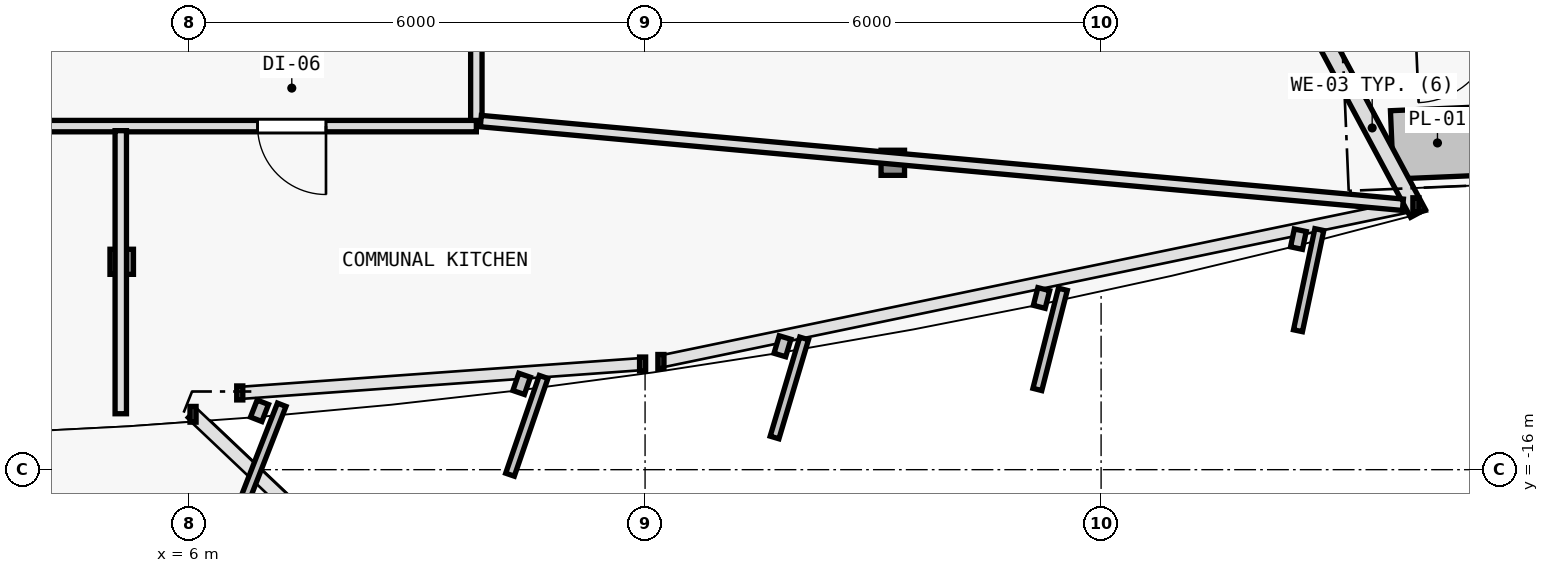
"""IFC4 building model, lengths in metres.
Left out: names, types, materials, properties, quantities, classifications, styles, units other than length and angle.
Written with IfcOpenShell. Run it as: python <this file> out.ifc"""

import sys

from ifc_helpers import new_model, si_unit, direction, frame, frame_2d, origin, origin_2d, place, context, subcontext, project, spatial, rectangle, i_section, extrude, element, fill, save


model = new_model("IFC4")
c1 = context("Model", 3, precision=1e-05, world=origin(), true_north=direction((0.0, 1.0)))
c2 = subcontext(c1, "Body", "Model", "MODEL_VIEW")
j1 = project(units=[si_unit("LENGTHUNIT", "METRE"), si_unit("PLANEANGLEUNIT", "RADIAN")], contexts=[c1])
p1 = place(None, origin())
s1 = spatial("IfcSite", under=j1, at=p1, CompositionType="ELEMENT")
p2 = place(p1, origin())
s2 = spatial("IfcBuilding", under=s1, at=p2, CompositionType="ELEMENT")
p3 = place(p2, frame((0.0, 0.0, 283.2)))
s3 = spatial("IfcBuildingStorey", under=s2, at=p3, CompositionType="ELEMENT", Elevation=283.2)
p4 = place(p3, frame((5.114, -13.265, 0.006), z_axis=(-0.006934304776, 0.03521539092, 0.999355688261), x_axis=(-0.981159154887, -0.193201223549, 0.0)))
e1 = element("IfcColumn", 1, at=p4, inside=s3, PredefinedType="COLUMN", context=c2, shape_type="SweptSolid", body=[
    extrude(i_section(OverallWidth=0.309, OverallDepth=0.33, WebThickness=0.011, FlangeThickness=0.019, FilletRadius=0.027, at=origin_2d()), origin(), (0.0, 0.0, 1.0), 3.591),
])
p5 = place(p3, frame((15.259, -11.962, 0.006), z_axis=(-0.020596292833, 0.033511459955, 0.999226087917), x_axis=(-0.851954850327, -0.523615252838, 0.0)))
e2 = element("IfcColumn", 2, at=p5, inside=s3, PredefinedType="COLUMN", context=c2, shape_type="SweptSolid", body=[
    extrude(i_section(OverallWidth=0.309, OverallDepth=0.33, WebThickness=0.011, FlangeThickness=0.019, FilletRadius=0.027, at=origin_2d()), origin(), (0.0, 0.0, 1.0), 3.592),
])
p6 = place(p3, frame((20.964, -10.381, 0.0), z_axis=(0.0, 0.0, 1.0), x_axis=(0.472728849632, -0.881207940685, 0.0)))
e3 = element("IfcWall", 3, at=p6, inside=s3, PredefinedType="SOLIDWALL", context=c2, shape_type="SweptSolid", body=[
    extrude(rectangle(XDim=2.55, YDim=0.22, at=frame_2d((1.275, 0.0))), origin(), (0.0, 0.0, 1.0), 3.35),
])
p7 = place(p3, frame((9.78, 8.226, 0.0), z_axis=(0.0, 0.0, 1.0), x_axis=(0.0, -1.0, 0.0)))
e4 = element("IfcWall", 4, at=p7, inside=s3, PredefinedType="PARTITIONING", context=c2, shape_type="SweptSolid", body=[
    extrude(rectangle(XDim=19.706, YDim=0.15, at=frame_2d((9.853, 0.0))), origin(), (0.0, 0.0, 1.0), 2.775),
])
p8 = place(p7, frame((17.333, 0.0, 0.0)))
e5 = element("IfcOpeningElement", 5, at=p8, cuts=e4, PredefinedType="OPENING", context=c2, shape_type="SweptSolid", body=[
    extrude(rectangle(XDim=0.9, YDim=2.1, at=frame_2d((0.45, 1.05))), frame((0.0, 0.085, 0.0), z_axis=(0.0, -1.0, 0.0), x_axis=(1.0, 0.0, 0.0)), (0.0, 0.0, 1.0), 0.17),
])
p9 = place(p7, frame((14.78, 0.0, 0.0)))
e6 = element("IfcOpeningElement", 6, at=p9, cuts=e4, PredefinedType="OPENING", context=c2, shape_type="SweptSolid", body=[
    extrude(rectangle(XDim=0.85, YDim=2.1, at=frame_2d((0.425, 1.05))), frame((0.0, 0.085, 0.0), z_axis=(0.0, -1.0, 0.0), x_axis=(1.0, 0.0, 0.0)), (0.0, 0.0, 1.0), 0.17),
])
p10 = place(p7, frame((13.091, 0.0, 0.0)))
e7 = element("IfcOpeningElement", 7, at=p10, cuts=e4, PredefinedType="OPENING", context=c2, shape_type="SweptSolid", body=[
    extrude(rectangle(XDim=0.85, YDim=2.1, at=frame_2d((0.425, 1.05))), frame((0.0, 0.085, 0.0), z_axis=(0.0, -1.0, 0.0), x_axis=(1.0, 0.0, 0.0)), (0.0, 0.0, 1.0), 0.17),
])
p11 = place(p7, frame((11.397, 0.0, 0.0)))
e8 = element("IfcOpeningElement", 8, at=p11, cuts=e4, PredefinedType="OPENING", context=c2, shape_type="SweptSolid", body=[
    extrude(rectangle(XDim=0.85, YDim=2.1, at=frame_2d((0.425, 1.05))), frame((0.0, 0.085, 0.0), z_axis=(0.0, -1.0, 0.0), x_axis=(1.0, 0.0, 0.0)), (0.0, 0.0, 1.0), 0.17),
])
p12 = place(p7, frame((9.138, 0.0, 0.0)))
e9 = element("IfcOpeningElement", 9, at=p12, cuts=e4, PredefinedType="OPENING", context=c2, shape_type="SweptSolid", body=[
    extrude(rectangle(XDim=0.9, YDim=2.1, at=frame_2d((0.45, 1.05))), frame((0.0, 0.085, 0.0), z_axis=(0.0, -1.0, 0.0), x_axis=(1.0, 0.0, 0.0)), (0.0, 0.0, 1.0), 0.17),
])
p13 = place(p7, frame((6.661, 0.0, 0.0)))
e10 = element("IfcOpeningElement", 10, at=p13, cuts=e4, PredefinedType="OPENING", context=c2, shape_type="SweptSolid", body=[
    extrude(rectangle(XDim=0.9, YDim=2.1, at=frame_2d((0.45, 1.05))), frame((0.0, 0.085, 0.0), z_axis=(0.0, -1.0, 0.0), x_axis=(1.0, 0.0, 0.0)), (0.0, 0.0, 1.0), 0.17),
])
p14 = place(p7, frame((4.369, 0.0, 0.0)))
e11 = element("IfcOpeningElement", 11, at=p14, cuts=e4, PredefinedType="OPENING", context=c2, shape_type="SweptSolid", body=[
    extrude(rectangle(XDim=0.9, YDim=2.1, at=frame_2d((0.45, 1.05))), frame((0.0, 0.085, 0.0), z_axis=(0.0, -1.0, 0.0), x_axis=(1.0, 0.0, 0.0)), (0.0, 0.0, 1.0), 0.17),
])
p15 = place(p3, frame((9.78, -11.48, 0.0), z_axis=(0.0, 0.0, 1.0), x_axis=(-1.0, 0.0, 0.0)))
e12 = element("IfcWall", 12, at=p15, inside=s3, PredefinedType="PARTITIONING", context=c2, shape_type="SweptSolid", body=[
    extrude(rectangle(XDim=19.56, YDim=0.15, at=frame_2d((9.78, 0.0))), origin(), (0.0, 0.0, 1.0), 2.925),
])
p16 = place(p15, frame((11.58, 0.0, 0.0)))
e13 = element("IfcOpeningElement", 13, at=p16, cuts=e12, PredefinedType="OPENING", context=c2, shape_type="SweptSolid", body=[
    extrude(rectangle(XDim=0.9, YDim=2.1, at=frame_2d((0.45, 1.05))), frame((0.0, 0.085, 0.0), z_axis=(0.0, -1.0, 0.0), x_axis=(1.0, 0.0, 0.0)), (0.0, 0.0, 1.0), 0.17),
])
p17 = place(p15, frame((1.978, 0.0, 0.0)))
e14 = element("IfcOpeningElement", 14, at=p17, cuts=e12, PredefinedType="OPENING", context=c2, shape_type="SweptSolid", body=[
    extrude(rectangle(XDim=0.9, YDim=2.1, at=frame_2d((0.45, 1.05))), frame((0.0, 0.085, 0.0), z_axis=(0.0, -1.0, 0.0), x_axis=(1.0, 0.0, 0.0)), (0.0, 0.0, 1.0), 0.17),
])
p18 = place(p3, frame((5.102, -11.54, 0.0), z_axis=(0.0, 0.0, 1.0), x_axis=(0.0, -1.0, 0.0)))
e15 = element("IfcWall", 15, at=p18, inside=s3, PredefinedType="PARTITIONING", context=c2, shape_type="SweptSolid", body=[
    extrude(rectangle(XDim=3.724, YDim=0.15, at=frame_2d((1.862, 0.0))), origin(), (0.0, 0.0, 1.0), 2.775),
])
p19 = place(p3, frame((9.839, -11.414, 0.0), z_axis=(0.0, 0.0, 1.0), x_axis=(0.995906502278, -0.09038937283, 0.0)))
e16 = element("IfcWall", 16, at=p19, inside=s3, PredefinedType="PARTITIONING", context=c2, shape_type="SweptSolid", body=[
    extrude(rectangle(XDim=12.181, YDim=0.15, at=frame_2d((6.091, 0.0))), origin(), (0.0, 0.0, 1.0), 3.015),
])
p20 = place(p17, origin())
e17 = element("IfcDoor", 17, at=p20, inside=s3, OperationType="SINGLE_SWING_LEFT", PredefinedType="DOOR", context=c2, shape_type="SweptSolid", body=[
    extrude(rectangle(XDim=0.9, YDim=2.1, at=frame_2d((0.45, 1.05))), frame((0.0, 0.025, 0.0), z_axis=(0.0, -1.0, 0.0), x_axis=(1.0, 0.0, 0.0)), (0.0, 0.0, 1.0), 0.05),
])
fill(e14, e17)
save(model, sys.argv[1])
